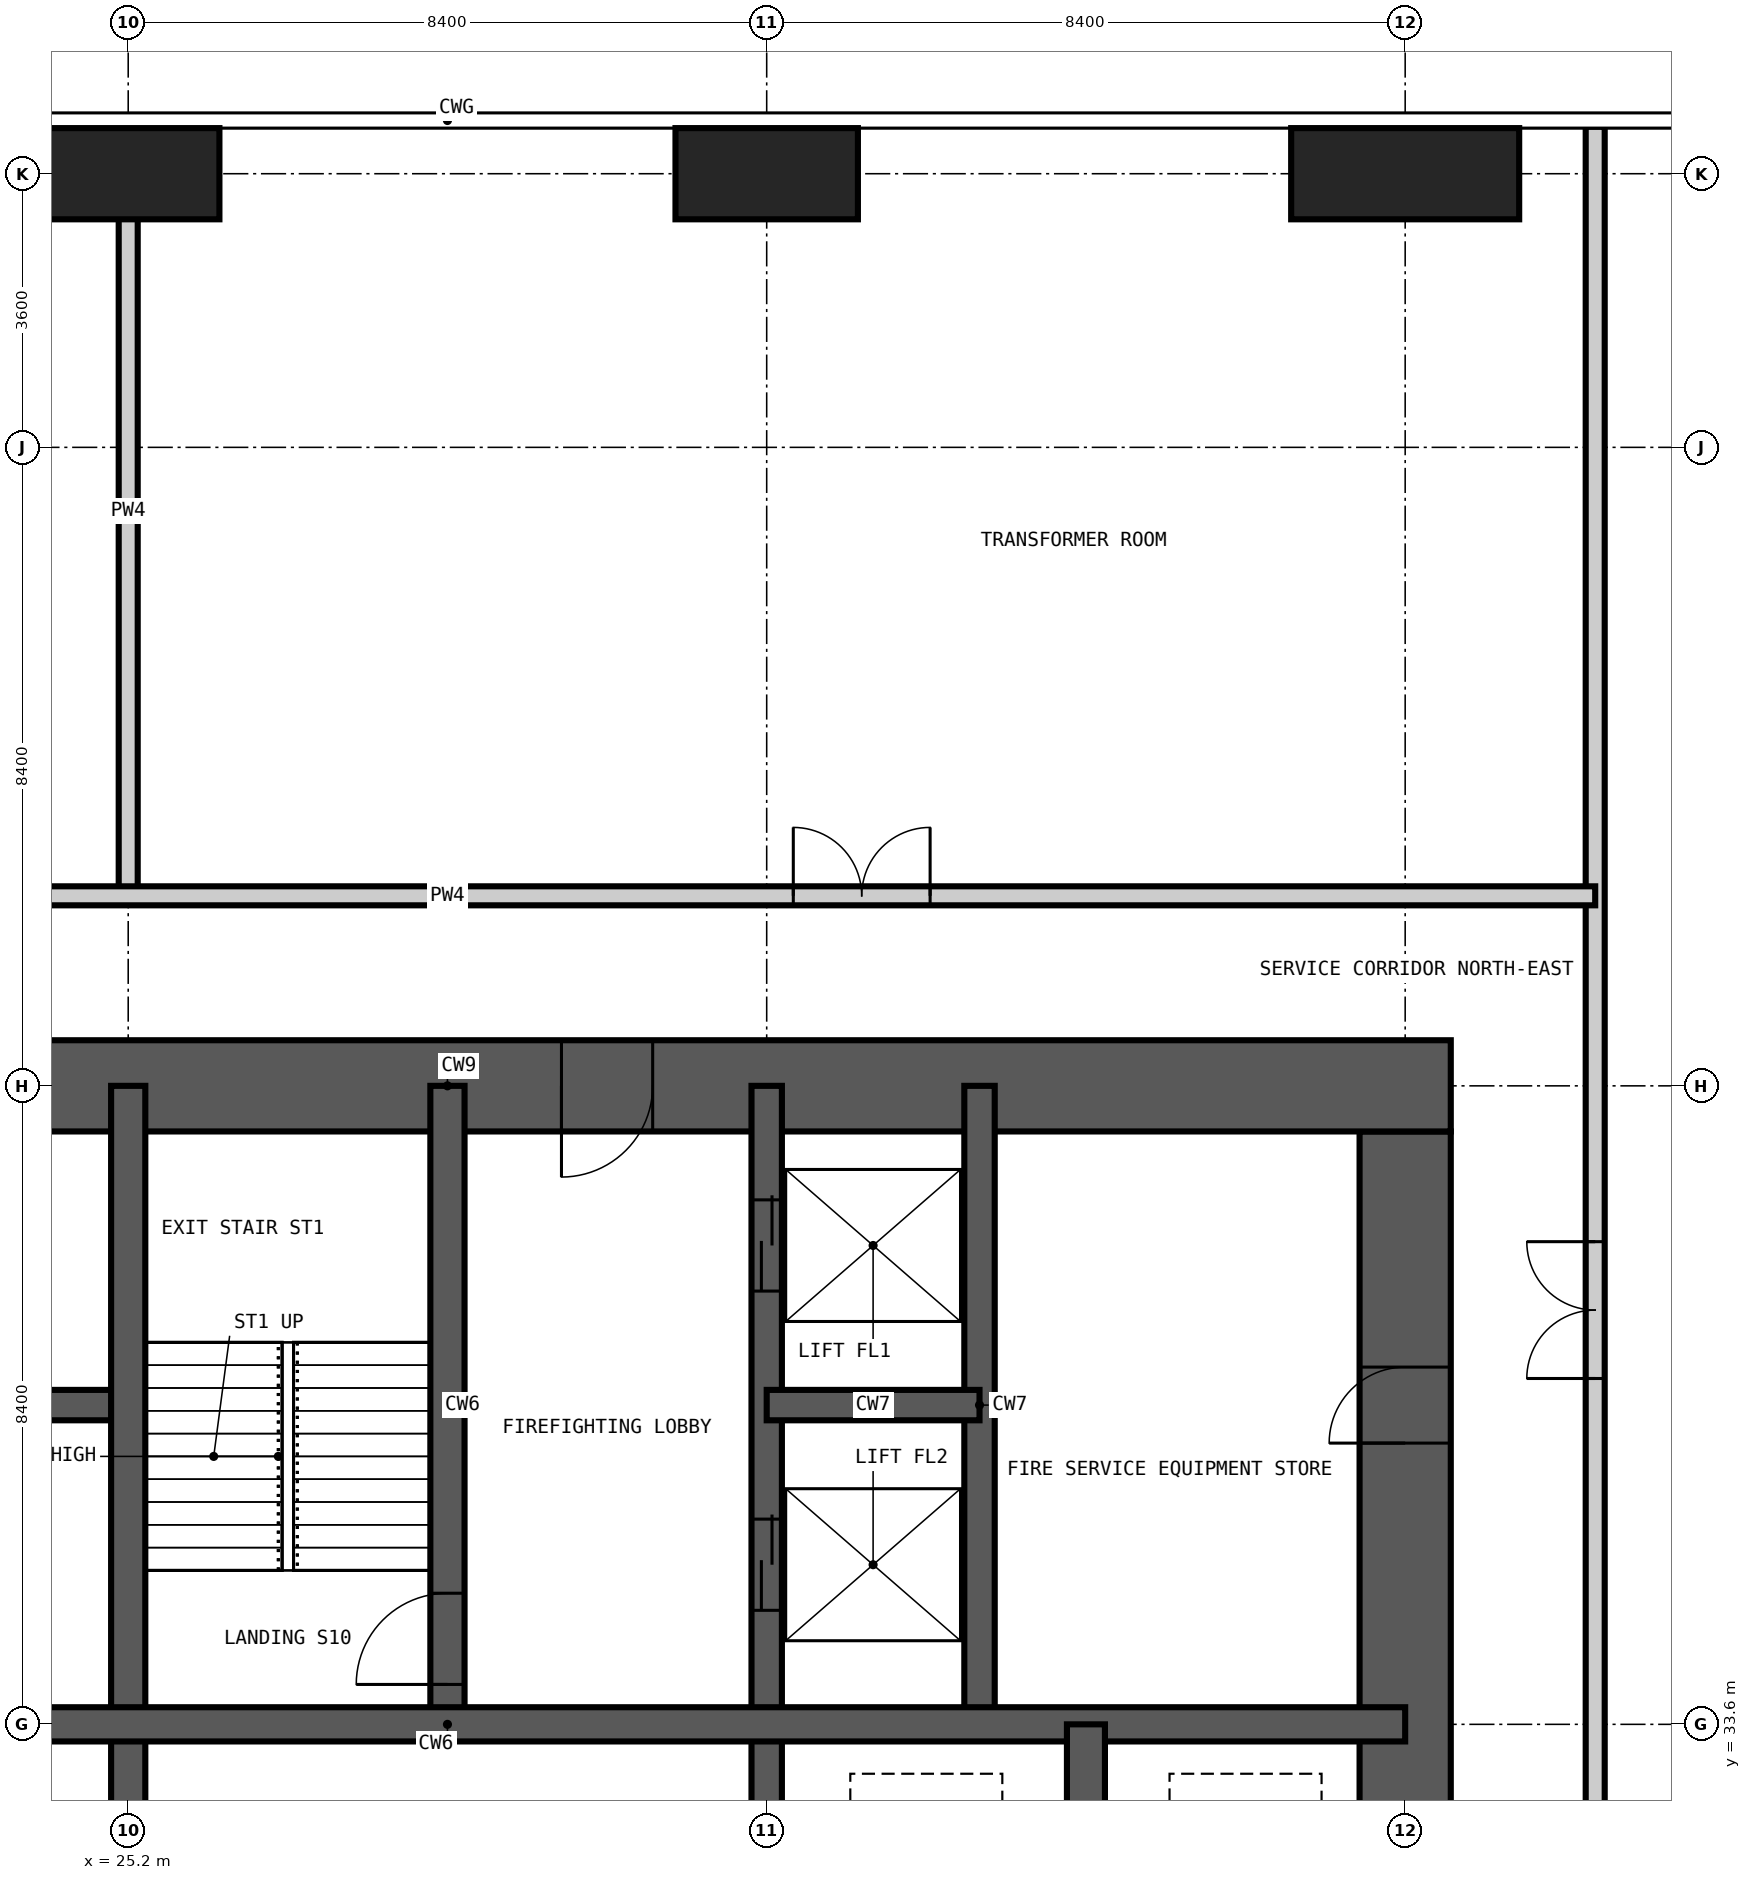
"""IFC4 building model, lengths in metres.
Left out: names, types, materials, properties, quantities, classifications, styles, units other than length and angle.
Written with IfcOpenShell. Run it as: python <this file> out.ifc"""

import sys

from ifc_helpers import new_model, si_unit, direction, frame, frame_2d, origin, origin_2d, place, context, subcontext, project, spatial, rectangle, extrude, element, fill, save


model = new_model("IFC4")
c1 = context("Model", 3, precision=1e-05, world=origin(), true_north=direction((0.0, 1.0)))
c2 = subcontext(c1, "Body", "Model", "MODEL_VIEW")
j1 = project(units=[si_unit("LENGTHUNIT", "METRE"), si_unit("PLANEANGLEUNIT", "RADIAN")], contexts=[c1])
p1 = place(None, origin())
s1 = spatial("IfcSite", under=j1, at=p1, CompositionType="ELEMENT")
p2 = place(p1, origin())
s2 = spatial("IfcBuilding", under=s1, at=p2, CompositionType="ELEMENT")
p3 = place(p2, frame((0.0, 0.0, 220.2)))
s3 = spatial("IfcBuildingStorey", under=s2, at=p3, CompositionType="ELEMENT", Elevation=220.2)
for number, where, z_axis, x_axis in (
    (1, (25.2, 54.0, -0.4), (0.0, 0.0, 1.0), (1.0, 0.0, 0.0)),
    (2, (33.6, 54.0, -0.4), (0.0, 0.0, 1.0), (1.0, 0.0, 0.0)),
):
    element("IfcColumn", number, at=place(p3, frame(where, z_axis=z_axis, x_axis=x_axis)), inside=s3, PredefinedType="COLUMN", context=c2, shape_type="SweptSolid", body=[
        extrude(rectangle(XDim=2.4, YDim=1.2, at=origin_2d()), origin(), (0.0, 0.0, 1.0), 5.45),
    ])
p4 = place(p3, frame((42.0, 54.0, -0.4), z_axis=(0.0, 0.0, 1.0), x_axis=(1.0, 0.0, 0.0)))
e3 = element("IfcColumn", 3, at=p4, inside=s3, PredefinedType="COLUMN", context=c2, shape_type="SweptSolid", body=[
    extrude(rectangle(XDim=3.0, YDim=1.2, at=origin_2d()), origin(), (0.0, 0.0, 1.0), 5.45),
])
p5 = place(p3, frame((42.0, 17.4, -0.4), z_axis=(0.0, 0.0, 1.0), x_axis=(0.0, 1.0, 0.0)))
e4 = element("IfcWall", 4, at=p5, inside=s3, PredefinedType="SHEAR", context=c2, shape_type="SweptSolid", body=[
    extrude(rectangle(XDim=24.0, YDim=1.2, at=frame_2d((12.0, 0.0))), origin(), (0.0, 0.0, 1.0), 5.45),
])
p6 = place(p5, frame((0.2, 0.0, 0.4)))
e5 = element("IfcOpeningElement", 5, at=p6, cuts=e4, PredefinedType="OPENING", context=c2, shape_type="SweptSolid", body=[
    extrude(rectangle(XDim=1.2, YDim=2.2, at=frame_2d((0.6, 1.1))), frame((0.0, 0.61, 0.0), z_axis=(0.0, -1.0, 0.0), x_axis=(1.0, 0.0, 0.0)), (0.0, 0.0, 1.0), 1.22),
])
p7 = place(p5, frame((11.5, 0.0, 0.4)))
e6 = element("IfcOpeningElement", 6, at=p7, cuts=e4, PredefinedType="OPENING", context=c2, shape_type="SweptSolid", body=[
    extrude(rectangle(XDim=1.0, YDim=2.1, at=frame_2d((0.5, 1.05))), frame((0.0, 0.61, 0.0), z_axis=(0.0, -1.0, 0.0), x_axis=(1.0, 0.0, 0.0)), (0.0, 0.0, 1.0), 1.22),
])
p8 = place(p5, frame((19.9, 0.0, 0.4)))
e7 = element("IfcOpeningElement", 7, at=p8, cuts=e4, PredefinedType="OPENING", context=c2, shape_type="SweptSolid", body=[
    extrude(rectangle(XDim=1.0, YDim=2.1, at=frame_2d((0.5, 1.05))), frame((0.0, 0.61, 0.0), z_axis=(0.0, -1.0, 0.0), x_axis=(1.0, 0.0, 0.0)), (0.0, 0.0, 1.0), 1.22),
])
p9 = place(p3, frame((42.6, 42.0, -0.4), z_axis=(0.0, 0.0, 1.0), x_axis=(-1.0, 0.0, 0.0)))
e8 = element("IfcWall", 8, at=p9, inside=s3, PredefinedType="SHEAR", context=c2, shape_type="SweptSolid", body=[
    extrude(rectangle(XDim=26.4, YDim=1.2, at=frame_2d((13.2, 0.0))), origin(), (0.0, 0.0, 1.0), 5.45),
])
p10 = place(p9, frame((21.1, 0.0, 0.4)))
e9 = element("IfcOpeningElement", 9, at=p10, cuts=e8, PredefinedType="OPENING", context=c2, shape_type="SweptSolid", body=[
    extrude(rectangle(XDim=1.0, YDim=2.1, at=frame_2d((0.5, 1.05))), frame((0.0, 0.61, 0.0), z_axis=(0.0, -1.0, 0.0), x_axis=(1.0, 0.0, 0.0)), (0.0, 0.0, 1.0), 1.22),
])
p11 = place(p9, frame((10.5, 0.0, 0.4)))
e10 = element("IfcOpeningElement", 10, at=p11, cuts=e8, PredefinedType="OPENING", context=c2, shape_type="SweptSolid", body=[
    extrude(rectangle(XDim=1.2, YDim=2.2, at=frame_2d((0.6, 1.1))), frame((0.0, 0.61, 0.0), z_axis=(0.0, -1.0, 0.0), x_axis=(1.0, 0.0, 0.0)), (0.0, 0.0, 1.0), 1.22),
])
p12 = place(p3, frame((33.6, 16.8, -0.4), z_axis=(0.0, 0.0, 1.0), x_axis=(0.0, 1.0, 0.0)))
e11 = element("IfcWall", 11, at=p12, inside=s3, PredefinedType="SHEAR", context=c2, shape_type="SweptSolid", body=[
    extrude(rectangle(XDim=25.2, YDim=0.4, at=frame_2d((12.6, 0.0))), origin(), (0.0, 0.0, 1.0), 5.45),
])
p13 = place(p12, frame((22.5, 0.0, 0.4)))
e12 = element("IfcOpeningElement", 12, at=p13, cuts=e11, PredefinedType="OPENING", context=c2, shape_type="SweptSolid", body=[
    extrude(rectangle(XDim=1.2, YDim=2.2, at=frame_2d((0.6, 1.1))), frame((0.0, 0.21, 0.0), z_axis=(0.0, -1.0, 0.0), x_axis=(1.0, 0.0, 0.0)), (0.0, 0.0, 1.0), 0.42),
])
p14 = place(p12, frame((18.3, 0.0, 0.4)))
e13 = element("IfcOpeningElement", 13, at=p14, cuts=e11, PredefinedType="OPENING", context=c2, shape_type="SweptSolid", body=[
    extrude(rectangle(XDim=1.2, YDim=2.2, at=frame_2d((0.6, 1.1))), frame((0.0, 0.21, 0.0), z_axis=(0.0, -1.0, 0.0), x_axis=(1.0, 0.0, 0.0)), (0.0, 0.0, 1.0), 0.42),
])
for number, where, z_axis, x_axis in (
    (14, (36.4, 33.6, -0.4), (0.0, 0.0, 1.0), (0.0, 1.0, 0.0)),
    (15, (16.8, 37.8, -0.4), (0.0, 0.0, 1.0), (1.0, 0.0, 0.0)),
):
    element("IfcWall", number, at=place(p3, frame(where, z_axis=z_axis, x_axis=x_axis)), inside=s3, PredefinedType="SHEAR", context=c2, shape_type="SweptSolid", body=[
        extrude(rectangle(XDim=8.4, YDim=0.4, at=frame_2d((4.2, 0.0))), origin(), (0.0, 0.0, 1.0), 5.45),
    ])
p15 = place(p3, frame((33.6, 37.8, -0.4), z_axis=(0.0, 0.0, 1.0), x_axis=(1.0, 0.0, 0.0)))
e16 = element("IfcWall", 16, at=p15, inside=s3, PredefinedType="SHEAR", context=c2, shape_type="SweptSolid", body=[
    extrude(rectangle(XDim=2.8, YDim=0.4, at=frame_2d((1.4, 0.0))), origin(), (0.0, 0.0, 1.0), 5.45),
])
p16 = place(p3, frame((25.2, 16.8, -0.4), z_axis=(0.0, 0.0, 1.0), x_axis=(0.0, 1.0, 0.0)))
e17 = element("IfcWall", 17, at=p16, inside=s3, PredefinedType="SHEAR", context=c2, shape_type="SweptSolid", body=[
    extrude(rectangle(XDim=25.2, YDim=0.45, at=frame_2d((12.6, 0.0))), origin(), (0.0, 0.0, 1.0), 5.45),
])
p17 = place(p16, frame((12.1, 0.0, 0.4)))
e18 = element("IfcOpeningElement", 18, at=p17, cuts=e17, PredefinedType="OPENING", context=c2, shape_type="SweptSolid", body=[
    extrude(rectangle(XDim=1.0, YDim=2.1, at=frame_2d((0.5, 1.05))), frame((0.0, 0.235, 0.0), z_axis=(0.0, -1.0, 0.0), x_axis=(1.0, 0.0, 0.0)), (0.0, 0.0, 1.0), 0.47),
])
p18 = place(p3, frame((29.4, 33.6, -0.4), z_axis=(0.0, 0.0, 1.0), x_axis=(0.0, 1.0, 0.0)))
e19 = element("IfcWall", 19, at=p18, inside=s3, PredefinedType="SHEAR", context=c2, shape_type="SweptSolid", body=[
    extrude(rectangle(XDim=8.4, YDim=0.45, at=frame_2d((4.2, 0.0))), origin(), (0.0, 0.0, 1.0), 5.45),
])
p19 = place(p18, frame((0.525, 0.0, 0.4)))
e20 = element("IfcOpeningElement", 20, at=p19, cuts=e19, PredefinedType="OPENING", context=c2, shape_type="SweptSolid", body=[
    extrude(rectangle(XDim=1.2, YDim=2.2, at=frame_2d((0.6, 1.1))), frame((0.0, 0.235, 0.0), z_axis=(0.0, -1.0, 0.0), x_axis=(1.0, 0.0, 0.0)), (0.0, 0.0, 1.0), 0.47),
])
p20 = place(p3, frame((16.8, 33.6, -0.4), z_axis=(0.0, 0.0, 1.0), x_axis=(1.0, 0.0, 0.0)))
e21 = element("IfcWall", 21, at=p20, inside=s3, PredefinedType="SHEAR", context=c2, shape_type="SweptSolid", body=[
    extrude(rectangle(XDim=25.2, YDim=0.45, at=frame_2d((12.6, 0.0))), origin(), (0.0, 0.0, 1.0), 5.45),
])
p21 = place(p3, frame((37.8, 30.8, -0.4), z_axis=(0.0, 0.0, 1.0), x_axis=(0.0, 1.0, 0.0)))
e22 = element("IfcWall", 22, at=p21, inside=s3, PredefinedType="SHEAR", context=c2, shape_type="SweptSolid", body=[
    extrude(rectangle(XDim=2.8, YDim=0.5, at=frame_2d((1.4, 0.0))), origin(), (0.0, 0.0, 1.0), 5.45),
])
p22 = place(p3, frame((25.2, 44.5, 0.0), z_axis=(0.0, 0.0, 1.0), x_axis=(0.0, 1.0, 0.0)))
e23 = element("IfcWall", 23, at=p22, inside=s3, PredefinedType="PARTITIONING", context=c2, shape_type="SweptSolid", body=[
    extrude(rectangle(XDim=10.118, YDim=0.25, at=frame_2d((5.059, 0.0))), origin(), (0.0, 0.0, 1.0), 5.05),
])
p23 = place(p3, frame((44.5, 4.182, 0.0), z_axis=(0.0, 0.0, 1.0), x_axis=(0.0, 1.0, 0.0)))
e24 = element("IfcWall", 24, at=p23, inside=s3, PredefinedType="PARTITIONING", context=c2, shape_type="SweptSolid", body=[
    extrude(rectangle(XDim=50.436, YDim=0.25, at=frame_2d((25.218, 0.0))), origin(), (0.0, 0.0, 1.0), 5.05),
])
p24 = place(p23, frame((14.668, 0.0, 0.0)))
e25 = element("IfcOpeningElement", 25, at=p24, cuts=e24, PredefinedType="OPENING", context=c2, shape_type="SweptSolid", body=[
    extrude(rectangle(XDim=1.8, YDim=2.4, at=frame_2d((0.9, 1.2))), frame((0.0, 0.135, 0.0), z_axis=(0.0, -1.0, 0.0), x_axis=(1.0, 0.0, 0.0)), (0.0, 0.0, 1.0), 0.27),
])
p25 = place(p23, frame((33.968, 0.0, 0.0)))
e26 = element("IfcOpeningElement", 26, at=p25, cuts=e24, PredefinedType="OPENING", context=c2, shape_type="SweptSolid", body=[
    extrude(rectangle(XDim=1.8, YDim=2.4, at=frame_2d((0.9, 1.2))), frame((0.0, 0.135, 0.0), z_axis=(0.0, -1.0, 0.0), x_axis=(1.0, 0.0, 0.0)), (0.0, 0.0, 1.0), 0.27),
])
p26 = place(p3, frame((14.3, 44.5, 0.0), z_axis=(0.0, 0.0, 1.0), x_axis=(1.0, 0.0, 0.0)))
e27 = element("IfcWall", 27, at=p26, inside=s3, PredefinedType="PARTITIONING", context=c2, shape_type="SweptSolid", body=[
    extrude(rectangle(XDim=30.2, YDim=0.25, at=frame_2d((15.1, 0.0))), origin(), (0.0, 0.0, 1.0), 5.05),
])
p27 = place(p26, frame((4.55, 0.0, 0.0)))
e28 = element("IfcOpeningElement", 28, at=p27, cuts=e27, PredefinedType="OPENING", context=c2, shape_type="SweptSolid", body=[
    extrude(rectangle(XDim=1.8, YDim=2.4, at=frame_2d((0.9, 1.2))), frame((0.0, 0.135, 0.0), z_axis=(0.0, -1.0, 0.0), x_axis=(1.0, 0.0, 0.0)), (0.0, 0.0, 1.0), 0.27),
])
p28 = place(p26, frame((19.65, 0.0, 0.0)))
e29 = element("IfcOpeningElement", 29, at=p28, cuts=e27, PredefinedType="OPENING", context=c2, shape_type="SweptSolid", body=[
    extrude(rectangle(XDim=1.8, YDim=2.4, at=frame_2d((0.9, 1.2))), frame((0.0, 0.135, 0.0), z_axis=(0.0, -1.0, 0.0), x_axis=(1.0, 0.0, 0.0)), (0.0, 0.0, 1.0), 0.27),
])
p29 = place(p19, origin())
e30 = element("IfcDoor", 30, at=p29, inside=s3, OperationType="SINGLE_SWING_LEFT", PredefinedType="DOOR", context=c2, shape_type="SweptSolid", body=[
    extrude(rectangle(XDim=1.2, YDim=2.2, at=frame_2d((0.6, 1.1))), frame((0.0, 0.025, 0.0), z_axis=(0.0, -1.0, 0.0), x_axis=(1.0, 0.0, 0.0)), (0.0, 0.0, 1.0), 0.05),
])
fill(e20, e30)
p30 = place(p13, origin())
e31 = element("IfcDoor", 31, at=p30, inside=s3, OperationType="DOUBLE_DOOR_SLIDING", PredefinedType="DOOR", context=c2, shape_type="SweptSolid", body=[
    extrude(rectangle(XDim=1.2, YDim=2.2, at=frame_2d((0.6, 1.1))), frame((0.0, 0.025, 0.0), z_axis=(0.0, -1.0, 0.0), x_axis=(1.0, 0.0, 0.0)), (0.0, 0.0, 1.0), 0.05),
])
fill(e12, e31)
p31 = place(p14, origin())
e32 = element("IfcDoor", 32, at=p31, inside=s3, OperationType="DOUBLE_DOOR_SLIDING", PredefinedType="DOOR", context=c2, shape_type="SweptSolid", body=[
    extrude(rectangle(XDim=1.2, YDim=2.2, at=frame_2d((0.6, 1.1))), frame((0.0, 0.025, 0.0), z_axis=(0.0, -1.0, 0.0), x_axis=(1.0, 0.0, 0.0)), (0.0, 0.0, 1.0), 0.05),
])
fill(e13, e32)
p32 = place(p25, origin())
e33 = element("IfcDoor", 33, at=p32, inside=s3, OperationType="DOUBLE_DOOR_DOUBLE_SWING", PredefinedType="DOOR", context=c2, shape_type="SweptSolid", body=[
    extrude(rectangle(XDim=1.8, YDim=2.4, at=frame_2d((0.9, 1.2))), frame((0.0, 0.025, 0.0), z_axis=(0.0, -1.0, 0.0), x_axis=(1.0, 0.0, 0.0)), (0.0, 0.0, 1.0), 0.05),
])
fill(e26, e33)
p33 = place(p28, origin())
e34 = element("IfcDoor", 34, at=p33, inside=s3, OperationType="DOUBLE_DOOR_DOUBLE_SWING", PredefinedType="DOOR", context=c2, shape_type="SweptSolid", body=[
    extrude(rectangle(XDim=1.8, YDim=2.4, at=frame_2d((0.9, 1.2))), frame((0.0, 0.025, 0.0), z_axis=(0.0, -1.0, 0.0), x_axis=(1.0, 0.0, 0.0)), (0.0, 0.0, 1.0), 0.05),
])
fill(e29, e34)
p34 = place(p11, origin())
e35 = element("IfcDoor", 35, at=p34, inside=s3, OperationType="SINGLE_SWING_RIGHT", PredefinedType="DOOR", context=c2, shape_type="SweptSolid", body=[
    extrude(rectangle(XDim=1.2, YDim=2.2, at=frame_2d((0.6, 1.1))), frame((0.0, 0.025, 0.0), z_axis=(0.0, -1.0, 0.0), x_axis=(1.0, 0.0, 0.0)), (0.0, 0.0, 1.0), 0.05),
])
fill(e10, e35)
p35 = place(p8, origin())
e36 = element("IfcDoor", 36, at=p35, inside=s3, OperationType="SINGLE_SWING_LEFT", PredefinedType="DOOR", context=c2, shape_type="SweptSolid", body=[
    extrude(rectangle(XDim=1.0, YDim=2.1, at=frame_2d((0.5, 1.05))), frame((0.0, 0.025, 0.0), z_axis=(0.0, -1.0, 0.0), x_axis=(1.0, 0.0, 0.0)), (0.0, 0.0, 1.0), 0.05),
])
fill(e7, e36)
save(model, sys.argv[1])
